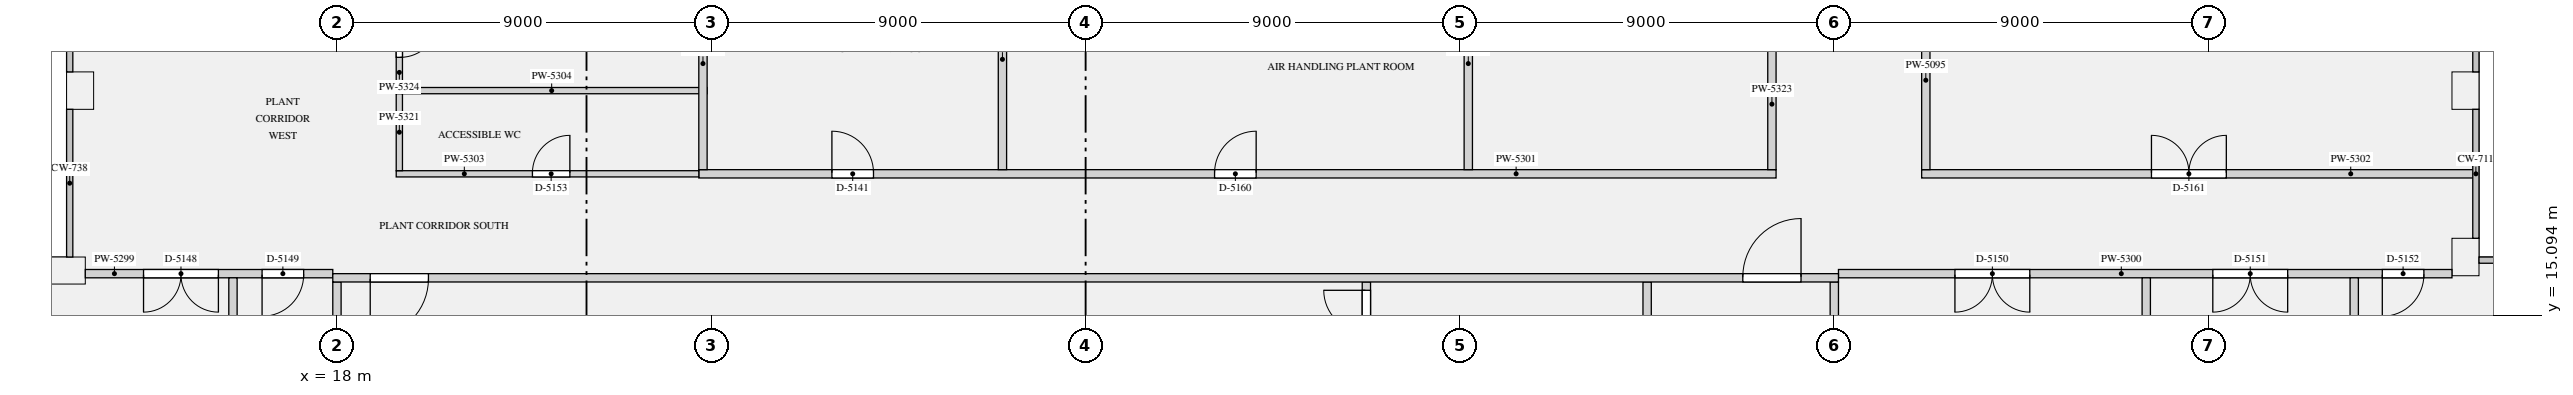
"""IFC4 building model, lengths in metres.
Left out: names, types, materials, properties, quantities, classifications, styles, units other than length and angle.
Written with IfcOpenShell. Run it as: python <this file> out.ifc"""

import sys

from ifc_helpers import new_model, si_unit, direction, frame, frame_2d, origin, origin_2d, place, context, subcontext, project, spatial, rectangle, extrude, element, fill, save


model = new_model("IFC4")
c1 = context("Model", 3, precision=1e-05, world=origin(), true_north=direction((0.0, 1.0)))
c2 = subcontext(c1, "Body", "Model", "MODEL_VIEW")
j1 = project(units=[si_unit("LENGTHUNIT", "METRE"), si_unit("PLANEANGLEUNIT", "RADIAN")], contexts=[c1])
p1 = place(None, origin())
s1 = spatial("IfcSite", under=j1, at=p1, CompositionType="ELEMENT")
p2 = place(p1, origin())
s2 = spatial("IfcBuilding", under=s1, at=p2, CompositionType="ELEMENT")
p3 = place(p2, frame((0.0, 0.0, 235.8)))
s3 = spatial("IfcBuildingStorey", under=s2, at=p3, CompositionType="ELEMENT", Elevation=235.8)
for number, where, z_axis, x_axis in (
    (1, (69.175, 16.5, 0.0), (0.0, 0.0, 1.0), (0.0, 1.0, 0.0)),
    (2, (69.175, 20.5, 0.0), (0.0, 0.0, 1.0), (0.0, 1.0, 0.0)),
    (3, (11.825, 20.5, 0.0), (0.0, 0.0, 1.0), (0.0, -1.0, 0.0)),
    (4, (11.5, 16.175, 0.0), (0.0, 0.0, 1.0), (-1.0, 0.0, 0.0)),
):
    element("IfcColumn", number, at=place(p3, frame(where, z_axis=z_axis, x_axis=x_axis)), inside=s3, PredefinedType="USERDEFINED", context=c2, shape_type="SweptSolid", body=[
        extrude(rectangle(XDim=0.9, YDim=0.65, at=origin_2d()), origin(), (0.0, 0.0, 1.0), 4.2),
    ])
p4 = place(p3, frame((18.0, 12.5, 0.0), z_axis=(0.0, 0.0, 1.0), x_axis=(0.0, 1.0, 0.0)))
e5 = element("IfcWall", 5, at=p4, inside=s3, PredefinedType="PARTITIONING", context=c2, shape_type="SweptSolid", body=[
    extrude(rectangle(XDim=3.4, YDim=0.2, at=frame_2d((1.7, 0.0))), origin(), (0.0, 0.0, 1.0), 3.85),
])
p5 = place(p3, frame((42.75, 12.5, 0.0), z_axis=(0.0, 0.0, 1.0), x_axis=(0.0, 1.0, 0.0)))
e6 = element("IfcWall", 6, at=p5, inside=s3, PredefinedType="PARTITIONING", context=c2, shape_type="SweptSolid", body=[
    extrude(rectangle(XDim=3.4, YDim=0.2, at=frame_2d((1.7, 0.0))), origin(), (0.0, 0.0, 1.0), 3.85),
])
p6 = place(p5, frame((2.2, 0.0, 0.0)))
e7 = element("IfcOpeningElement", 7, at=p6, cuts=e6, PredefinedType="OPENING", context=c2, shape_type="SweptSolid", body=[
    extrude(rectangle(XDim=1.0, YDim=2.1, at=frame_2d((0.5, 1.05))), frame((0.0, 0.11, 0.0), z_axis=(0.0, -1.0, 0.0), x_axis=(1.0, 0.0, 0.0)), (0.0, 0.0, 1.0), 0.22),
])
p7 = place(p3, frame((49.5, 12.5, 0.0), z_axis=(0.0, 0.0, 1.0), x_axis=(0.0, 1.0, 0.0)))
e8 = element("IfcWall", 8, at=p7, inside=s3, PredefinedType="PARTITIONING", context=c2, shape_type="SweptSolid", body=[
    extrude(rectangle(XDim=3.4, YDim=0.2, at=frame_2d((1.7, 0.0))), origin(), (0.0, 0.0, 1.0), 3.85),
])
p8 = place(p7, frame((1.15, 0.0, 0.0)))
e9 = element("IfcOpeningElement", 9, at=p8, cuts=e8, PredefinedType="OPENING", context=c2, shape_type="SweptSolid", body=[
    extrude(rectangle(XDim=1.1, YDim=2.1, at=frame_2d((0.55, 1.05))), frame((0.0, 0.11, 0.0), z_axis=(0.0, -1.0, 0.0), x_axis=(1.0, 0.0, 0.0)), (0.0, 0.0, 1.0), 0.22),
])
p9 = place(p3, frame((54.0, 12.5, 0.0), z_axis=(0.0, 0.0, 1.0), x_axis=(0.0, 1.0, 0.0)))
e10 = element("IfcWall", 10, at=p9, inside=s3, PredefinedType="PARTITIONING", context=c2, shape_type="SweptSolid", body=[
    extrude(rectangle(XDim=3.4, YDim=0.2, at=frame_2d((1.7, 0.0))), origin(), (0.0, 0.0, 1.0), 3.85),
])
p10 = place(p3, frame((17.9, 16.0, 0.0), z_axis=(0.0, 0.0, 1.0), x_axis=(1.0, 0.0, 0.0)))
e11 = element("IfcWall", 11, at=p10, inside=s3, PredefinedType="PARTITIONING", context=c2, shape_type="SweptSolid", body=[
    extrude(rectangle(XDim=36.2, YDim=0.2, at=frame_2d((18.1, 0.0))), origin(), (0.0, 0.0, 1.0), 3.85),
])
p11 = place(p10, frame((0.9, 0.0, 0.0)))
e12 = element("IfcOpeningElement", 12, at=p11, cuts=e11, PredefinedType="OPENING", context=c2, shape_type="SweptSolid", body=[
    extrude(rectangle(XDim=1.4, YDim=2.1, at=frame_2d((0.7, 1.05))), frame((0.0, 0.11, 0.0), z_axis=(0.0, -1.0, 0.0), x_axis=(1.0, 0.0, 0.0)), (0.0, 0.0, 1.0), 0.22),
])
p12 = place(p10, frame((33.9, 0.0, 0.0)))
e13 = element("IfcOpeningElement", 13, at=p12, cuts=e11, PredefinedType="OPENING", context=c2, shape_type="SweptSolid", body=[
    extrude(rectangle(XDim=1.4, YDim=2.1, at=frame_2d((0.7, 1.05))), frame((0.0, 0.11, 0.0), z_axis=(0.0, -1.0, 0.0), x_axis=(1.0, 0.0, 0.0)), (0.0, 0.0, 1.0), 0.22),
])
p13 = place(p3, frame((11.95, 16.1, 0.0), z_axis=(0.0, 0.0, 1.0), x_axis=(1.0, 0.0, 0.0)))
e14 = element("IfcWall", 14, at=p13, inside=s3, PredefinedType="PARTITIONING", context=c2, shape_type="SweptSolid", body=[
    extrude(rectangle(XDim=5.95, YDim=0.2, at=frame_2d((2.975, 0.0))), origin(), (0.0, 0.0, 1.0), 3.85),
])
p14 = place(p13, frame((1.4, 0.0, 0.0)))
e15 = element("IfcOpeningElement", 15, at=p14, cuts=e14, PredefinedType="OPENING", context=c2, shape_type="SweptSolid", body=[
    extrude(rectangle(XDim=1.8, YDim=2.1, at=frame_2d((0.9, 1.05))), frame((0.0, 0.11, 0.0), z_axis=(0.0, -1.0, 0.0), x_axis=(1.0, 0.0, 0.0)), (0.0, 0.0, 1.0), 0.22),
])
p15 = place(p13, frame((4.25, 0.0, 0.0)))
e16 = element("IfcOpeningElement", 16, at=p15, cuts=e14, PredefinedType="OPENING", context=c2, shape_type="SweptSolid", body=[
    extrude(rectangle(XDim=1.0, YDim=2.1, at=frame_2d((0.5, 1.05))), frame((0.0, 0.11, 0.0), z_axis=(0.0, -1.0, 0.0), x_axis=(1.0, 0.0, 0.0)), (0.0, 0.0, 1.0), 0.22),
])
p16 = place(p3, frame((54.1, 16.1, 0.0), z_axis=(0.0, 0.0, 1.0), x_axis=(1.0, 0.0, 0.0)))
e17 = element("IfcWall", 17, at=p16, inside=s3, PredefinedType="PARTITIONING", context=c2, shape_type="SweptSolid", body=[
    extrude(rectangle(XDim=14.75, YDim=0.2, at=frame_2d((7.375, 0.0))), origin(), (0.0, 0.0, 1.0), 3.85),
])
p17 = place(p16, frame((2.8, 0.0, 0.0)))
e18 = element("IfcOpeningElement", 18, at=p17, cuts=e17, PredefinedType="OPENING", context=c2, shape_type="SweptSolid", body=[
    extrude(rectangle(XDim=1.8, YDim=2.1, at=frame_2d((0.9, 1.05))), frame((0.0, 0.11, 0.0), z_axis=(0.0, -1.0, 0.0), x_axis=(1.0, 0.0, 0.0)), (0.0, 0.0, 1.0), 0.22),
])
p18 = place(p16, frame((9.0, 0.0, 0.0)))
e19 = element("IfcOpeningElement", 19, at=p18, cuts=e17, PredefinedType="OPENING", context=c2, shape_type="SweptSolid", body=[
    extrude(rectangle(XDim=1.8, YDim=2.1, at=frame_2d((0.9, 1.05))), frame((0.0, 0.11, 0.0), z_axis=(0.0, -1.0, 0.0), x_axis=(1.0, 0.0, 0.0)), (0.0, 0.0, 1.0), 0.22),
])
p19 = place(p16, frame((13.075, 0.0, 0.0)))
e20 = element("IfcOpeningElement", 20, at=p19, cuts=e17, PredefinedType="OPENING", context=c2, shape_type="SweptSolid", body=[
    extrude(rectangle(XDim=1.0, YDim=2.1, at=frame_2d((0.5, 1.05))), frame((0.0, 0.11, 0.0), z_axis=(0.0, -1.0, 0.0), x_axis=(1.0, 0.0, 0.0)), (0.0, 0.0, 1.0), 0.22),
])
p20 = place(p3, frame((26.7, 18.5, 0.0), z_axis=(0.0, 0.0, 1.0), x_axis=(1.0, 0.0, 0.0)))
e21 = element("IfcWall", 21, at=p20, inside=s3, PredefinedType="PARTITIONING", context=c2, shape_type="SweptSolid", body=[
    extrude(rectangle(XDim=25.9, YDim=0.2, at=frame_2d((12.95, 0.0))), origin(), (0.0, 0.0, 1.0), 3.85),
])
p21 = place(p20, frame((3.2, 0.0, 0.0)))
e22 = element("IfcOpeningElement", 22, at=p21, cuts=e21, PredefinedType="OPENING", context=c2, shape_type="SweptSolid", body=[
    extrude(rectangle(XDim=1.0, YDim=2.1, at=frame_2d((0.5, 1.05))), frame((0.0, 0.11, 0.0), z_axis=(0.0, -1.0, 0.0), x_axis=(1.0, 0.0, 0.0)), (0.0, 0.0, 1.0), 0.22),
])
p22 = place(p20, frame((12.4, 0.0, 0.0)))
e23 = element("IfcOpeningElement", 23, at=p22, cuts=e21, PredefinedType="OPENING", context=c2, shape_type="SweptSolid", body=[
    extrude(rectangle(XDim=1.0, YDim=2.1, at=frame_2d((0.5, 1.05))), frame((0.0, 0.11, 0.0), z_axis=(0.0, -1.0, 0.0), x_axis=(1.0, 0.0, 0.0)), (0.0, 0.0, 1.0), 0.22),
])
p23 = place(p3, frame((56.1, 18.5, 0.0), z_axis=(0.0, 0.0, 1.0), x_axis=(1.0, 0.0, 0.0)))
e24 = element("IfcWall", 24, at=p23, inside=s3, PredefinedType="PARTITIONING", context=c2, shape_type="SweptSolid", body=[
    extrude(rectangle(XDim=13.307, YDim=0.2, at=frame_2d((6.653, 0.0))), origin(), (0.0, 0.0, 1.0), 3.85),
])
p24 = place(p23, frame((5.525, 0.0, 0.0)))
e25 = element("IfcOpeningElement", 25, at=p24, cuts=e24, PredefinedType="OPENING", context=c2, shape_type="SweptSolid", body=[
    extrude(rectangle(XDim=1.8, YDim=2.1, at=frame_2d((0.9, 1.05))), frame((0.0, 0.11, 0.0), z_axis=(0.0, -1.0, 0.0), x_axis=(1.0, 0.0, 0.0)), (0.0, 0.0, 1.0), 0.22),
])
p25 = place(p3, frame((19.425, 18.5, 0.0), z_axis=(0.0, 0.0, 1.0), x_axis=(1.0, 0.0, 0.0)))
e26 = element("IfcWall", 26, at=p25, inside=s3, PredefinedType="PARTITIONING", context=c2, shape_type="SweptSolid", body=[
    extrude(rectangle(XDim=7.275, YDim=0.15, at=frame_2d((3.637, 0.0))), origin(), (0.0, 0.0, 1.0), 3.85),
])
p26 = place(p25, frame((3.275, 0.0, 0.0)))
e27 = element("IfcOpeningElement", 27, at=p26, cuts=e26, PredefinedType="OPENING", context=c2, shape_type="SweptSolid", body=[
    extrude(rectangle(XDim=0.9, YDim=2.1, at=frame_2d((0.45, 1.05))), frame((0.0, 0.085, 0.0), z_axis=(0.0, -1.0, 0.0), x_axis=(1.0, 0.0, 0.0)), (0.0, 0.0, 1.0), 0.17),
])
p27 = place(p3, frame((19.425, 20.5, 0.0), z_axis=(0.0, 0.0, 1.0), x_axis=(1.0, 0.0, 0.0)))
e28 = element("IfcWall", 28, at=p27, inside=s3, PredefinedType="PARTITIONING", context=c2, shape_type="SweptSolid", body=[
    extrude(rectangle(XDim=7.475, YDim=0.15, at=frame_2d((3.737, 0.0))), origin(), (0.0, 0.0, 1.0), 3.85),
])
for number, where, z_axis, x_axis in (
    (29, (15.5, 0.093, 0.0), (0.0, 0.0, 1.0), (0.0, 1.0, 0.0)),
    (30, (61.5, 0.093, 0.0), (0.0, 0.0, 1.0), (0.0, 1.0, 0.0)),
    (31, (66.5, 0.093, 0.0), (0.0, 0.0, 1.0), (0.0, 1.0, 0.0)),
):
    element("IfcWall", number, at=place(p3, frame(where, z_axis=z_axis, x_axis=x_axis)), inside=s3, PredefinedType="PARTITIONING", context=c2, shape_type="SweptSolid", body=[
        extrude(rectangle(XDim=15.907, YDim=0.2, at=frame_2d((7.954, 0.0))), origin(), (0.0, 0.0, 1.0), 3.85),
    ])
p28 = place(p3, frame((19.5, 18.575, 0.0), z_axis=(0.0, 0.0, 1.0), x_axis=(0.0, 1.0, 0.0)))
e32 = element("IfcWall", 32, at=p28, inside=s3, PredefinedType="PARTITIONING", context=c2, shape_type="SweptSolid", body=[
    extrude(rectangle(XDim=1.85, YDim=0.15, at=frame_2d((0.925, 0.0))), origin(), (0.0, 0.0, 1.0), 3.85),
])
p29 = place(p3, frame((26.8, 18.6, 0.0), z_axis=(0.0, 0.0, 1.0), x_axis=(0.0, 1.0, 0.0)))
e33 = element("IfcWall", 33, at=p29, inside=s3, PredefinedType="PARTITIONING", context=c2, shape_type="SweptSolid", body=[
    extrude(rectangle(XDim=5.1, YDim=0.2, at=frame_2d((2.55, 0.0))), origin(), (0.0, 0.0, 1.0), 3.85),
])
p30 = place(p3, frame((34.0, 18.6, 0.0), z_axis=(0.0, 0.0, 1.0), x_axis=(0.0, 1.0, 0.0)))
e34 = element("IfcWall", 34, at=p30, inside=s3, PredefinedType="PARTITIONING", context=c2, shape_type="SweptSolid", body=[
    extrude(rectangle(XDim=5.304, YDim=0.2, at=frame_2d((2.652, 0.0))), origin(), (0.0, 0.0, 1.0), 3.85),
])
p31 = place(p3, frame((45.2, 18.6, 0.0), z_axis=(0.0, 0.0, 1.0), x_axis=(0.0, 1.0, 0.0)))
e35 = element("IfcWall", 35, at=p31, inside=s3, PredefinedType="PARTITIONING", context=c2, shape_type="SweptSolid", body=[
    extrude(rectangle(XDim=5.1, YDim=0.2, at=frame_2d((2.55, 0.0))), origin(), (0.0, 0.0, 1.0), 3.85),
])
p32 = place(p3, frame((52.5, 18.6, 0.0), z_axis=(0.0, 0.0, 1.0), x_axis=(0.0, 1.0, 0.0)))
e36 = element("IfcWall", 36, at=p32, inside=s3, PredefinedType="PARTITIONING", context=c2, shape_type="SweptSolid", body=[
    extrude(rectangle(XDim=7.3, YDim=0.2, at=frame_2d((3.65, 0.0))), origin(), (0.0, 0.0, 1.0), 3.85),
])
p33 = place(p32, frame((3.15, 0.0, 0.0)))
e37 = element("IfcOpeningElement", 37, at=p33, cuts=e36, PredefinedType="OPENING", context=c2, shape_type="SweptSolid", body=[
    extrude(rectangle(XDim=1.0, YDim=2.1, at=frame_2d((0.5, 1.05))), frame((0.0, 0.11, 0.0), z_axis=(0.0, -1.0, 0.0), x_axis=(1.0, 0.0, 0.0)), (0.0, 0.0, 1.0), 0.22),
])
p34 = place(p3, frame((56.2, 18.6, 0.0), z_axis=(0.0, 0.0, 1.0), x_axis=(0.0, 1.0, 0.0)))
e38 = element("IfcWall", 38, at=p34, inside=s3, PredefinedType="PARTITIONING", context=c2, shape_type="SweptSolid", body=[
    extrude(rectangle(XDim=4.3, YDim=0.2, at=frame_2d((2.15, 0.0))), origin(), (0.0, 0.0, 1.0), 3.85),
])
p35 = place(p3, frame((19.5, 20.575, 0.0), z_axis=(0.0, 0.0, 1.0), x_axis=(0.0, 1.0, 0.0)))
e39 = element("IfcWall", 39, at=p35, inside=s3, PredefinedType="PARTITIONING", context=c2, shape_type="SweptSolid", body=[
    extrude(rectangle(XDim=2.325, YDim=0.15, at=frame_2d((1.163, 0.0))), origin(), (0.0, 0.0, 1.0), 3.85),
])
p36 = place(p35, frame((0.725, 0.0, 0.0)))
e40 = element("IfcOpeningElement", 40, at=p36, cuts=e39, PredefinedType="OPENING", context=c2, shape_type="SweptSolid", body=[
    extrude(rectangle(XDim=0.9, YDim=2.1, at=frame_2d((0.45, 1.05))), frame((0.0, 0.085, 0.0), z_axis=(0.0, -1.0, 0.0), x_axis=(1.0, 0.0, 0.0)), (0.0, 0.0, 1.0), 0.17),
])
p37 = place(p6, origin())
e41 = element("IfcDoor", 41, at=p37, inside=s3, OperationType="SINGLE_SWING_RIGHT", PredefinedType="DOOR", context=c2, shape_type="SweptSolid", body=[
    extrude(rectangle(XDim=1.0, YDim=2.1, at=frame_2d((0.5, 1.05))), frame((0.0, 0.025, 0.0), z_axis=(0.0, -1.0, 0.0), x_axis=(1.0, 0.0, 0.0)), (0.0, 0.0, 1.0), 0.05),
])
fill(e7, e41)
p38 = place(p11, frame((1.4, 0.0, 0.0), z_axis=(0.0, 0.0, 1.0), x_axis=(-1.0, 0.0, 0.0)))
e42 = element("IfcDoor", 42, at=p38, inside=s3, OperationType="SINGLE_SWING_RIGHT", PredefinedType="DOOR", context=c2, shape_type="SweptSolid", body=[
    extrude(rectangle(XDim=1.4, YDim=2.1, at=frame_2d((0.7, 1.05))), frame((0.0, 0.025, 0.0), z_axis=(0.0, -1.0, 0.0), x_axis=(1.0, 0.0, 0.0)), (0.0, 0.0, 1.0), 0.05),
])
fill(e12, e42)
p39 = place(p12, origin())
e43 = element("IfcDoor", 43, at=p39, inside=s3, OperationType="SINGLE_SWING_RIGHT", PredefinedType="DOOR", context=c2, shape_type="SweptSolid", body=[
    extrude(rectangle(XDim=1.4, YDim=2.1, at=frame_2d((0.7, 1.05))), frame((0.0, 0.025, 0.0), z_axis=(0.0, -1.0, 0.0), x_axis=(1.0, 0.0, 0.0)), (0.0, 0.0, 1.0), 0.05),
])
fill(e13, e43)
p40 = place(p14, frame((1.8, 0.0, 0.0), z_axis=(0.0, 0.0, 1.0), x_axis=(-1.0, 0.0, 0.0)))
e44 = element("IfcDoor", 44, at=p40, inside=s3, OperationType="DOUBLE_DOOR_SINGLE_SWING", PredefinedType="DOOR", context=c2, shape_type="SweptSolid", body=[
    extrude(rectangle(XDim=1.8, YDim=2.1, at=frame_2d((0.9, 1.05))), frame((0.0, 0.025, 0.0), z_axis=(0.0, -1.0, 0.0), x_axis=(1.0, 0.0, 0.0)), (0.0, 0.0, 1.0), 0.05),
])
fill(e15, e44)
p41 = place(p15, frame((1.0, 0.0, 0.0), z_axis=(0.0, 0.0, 1.0), x_axis=(-1.0, 0.0, 0.0)))
e45 = element("IfcDoor", 45, at=p41, inside=s3, OperationType="SINGLE_SWING_RIGHT", PredefinedType="DOOR", context=c2, shape_type="SweptSolid", body=[
    extrude(rectangle(XDim=1.0, YDim=2.1, at=frame_2d((0.5, 1.05))), frame((0.0, 0.025, 0.0), z_axis=(0.0, -1.0, 0.0), x_axis=(1.0, 0.0, 0.0)), (0.0, 0.0, 1.0), 0.05),
])
fill(e16, e45)
p42 = place(p17, frame((1.8, 0.0, 0.0), z_axis=(0.0, 0.0, 1.0), x_axis=(-1.0, 0.0, 0.0)))
e46 = element("IfcDoor", 46, at=p42, inside=s3, OperationType="DOUBLE_DOOR_SINGLE_SWING", PredefinedType="DOOR", context=c2, shape_type="SweptSolid", body=[
    extrude(rectangle(XDim=1.8, YDim=2.1, at=frame_2d((0.9, 1.05))), frame((0.0, 0.025, 0.0), z_axis=(0.0, -1.0, 0.0), x_axis=(1.0, 0.0, 0.0)), (0.0, 0.0, 1.0), 0.05),
])
fill(e18, e46)
p43 = place(p18, frame((1.8, 0.0, 0.0), z_axis=(0.0, 0.0, 1.0), x_axis=(-1.0, 0.0, 0.0)))
e47 = element("IfcDoor", 47, at=p43, inside=s3, OperationType="DOUBLE_DOOR_SINGLE_SWING", PredefinedType="DOOR", context=c2, shape_type="SweptSolid", body=[
    extrude(rectangle(XDim=1.8, YDim=2.1, at=frame_2d((0.9, 1.05))), frame((0.0, 0.025, 0.0), z_axis=(0.0, -1.0, 0.0), x_axis=(1.0, 0.0, 0.0)), (0.0, 0.0, 1.0), 0.05),
])
fill(e19, e47)
p44 = place(p19, frame((1.0, 0.0, 0.0), z_axis=(0.0, 0.0, 1.0), x_axis=(-1.0, 0.0, 0.0)))
e48 = element("IfcDoor", 48, at=p44, inside=s3, OperationType="SINGLE_SWING_RIGHT", PredefinedType="DOOR", context=c2, shape_type="SweptSolid", body=[
    extrude(rectangle(XDim=1.0, YDim=2.1, at=frame_2d((0.5, 1.05))), frame((0.0, 0.025, 0.0), z_axis=(0.0, -1.0, 0.0), x_axis=(1.0, 0.0, 0.0)), (0.0, 0.0, 1.0), 0.05),
])
fill(e20, e48)
p45 = place(p26, origin())
e49 = element("IfcDoor", 49, at=p45, inside=s3, OperationType="SINGLE_SWING_RIGHT", PredefinedType="DOOR", context=c2, shape_type="SweptSolid", body=[
    extrude(rectangle(XDim=0.9, YDim=2.1, at=frame_2d((0.45, 1.05))), frame((0.0, 0.025, 0.0), z_axis=(0.0, -1.0, 0.0), x_axis=(1.0, 0.0, 0.0)), (0.0, 0.0, 1.0), 0.05),
])
fill(e27, e49)
p46 = place(p36, frame((0.9, 0.0, 0.0), z_axis=(0.0, 0.0, 1.0), x_axis=(-1.0, 0.0, 0.0)))
e50 = element("IfcDoor", 50, at=p46, inside=s3, OperationType="SINGLE_SWING_LEFT", PredefinedType="DOOR", context=c2, shape_type="SweptSolid", body=[
    extrude(rectangle(XDim=0.9, YDim=2.1, at=frame_2d((0.45, 1.05))), frame((0.0, 0.025, 0.0), z_axis=(0.0, -1.0, 0.0), x_axis=(1.0, 0.0, 0.0)), (0.0, 0.0, 1.0), 0.05),
])
fill(e40, e50)
p47 = place(p21, origin())
e51 = element("IfcDoor", 51, at=p47, inside=s3, OperationType="SINGLE_SWING_LEFT", PredefinedType="DOOR", context=c2, shape_type="SweptSolid", body=[
    extrude(rectangle(XDim=1.0, YDim=2.1, at=frame_2d((0.5, 1.05))), frame((0.0, 0.025, 0.0), z_axis=(0.0, -1.0, 0.0), x_axis=(1.0, 0.0, 0.0)), (0.0, 0.0, 1.0), 0.05),
])
fill(e22, e51)
p48 = place(p22, origin())
e52 = element("IfcDoor", 52, at=p48, inside=s3, OperationType="SINGLE_SWING_RIGHT", PredefinedType="DOOR", context=c2, shape_type="SweptSolid", body=[
    extrude(rectangle(XDim=1.0, YDim=2.1, at=frame_2d((0.5, 1.05))), frame((0.0, 0.025, 0.0), z_axis=(0.0, -1.0, 0.0), x_axis=(1.0, 0.0, 0.0)), (0.0, 0.0, 1.0), 0.05),
])
fill(e23, e52)
p49 = place(p24, origin())
e53 = element("IfcDoor", 53, at=p49, inside=s3, OperationType="DOUBLE_DOOR_SINGLE_SWING", PredefinedType="DOOR", context=c2, shape_type="SweptSolid", body=[
    extrude(rectangle(XDim=1.8, YDim=2.1, at=frame_2d((0.9, 1.05))), frame((0.0, 0.025, 0.0), z_axis=(0.0, -1.0, 0.0), x_axis=(1.0, 0.0, 0.0)), (0.0, 0.0, 1.0), 0.05),
])
fill(e25, e53)
save(model, sys.argv[1])
